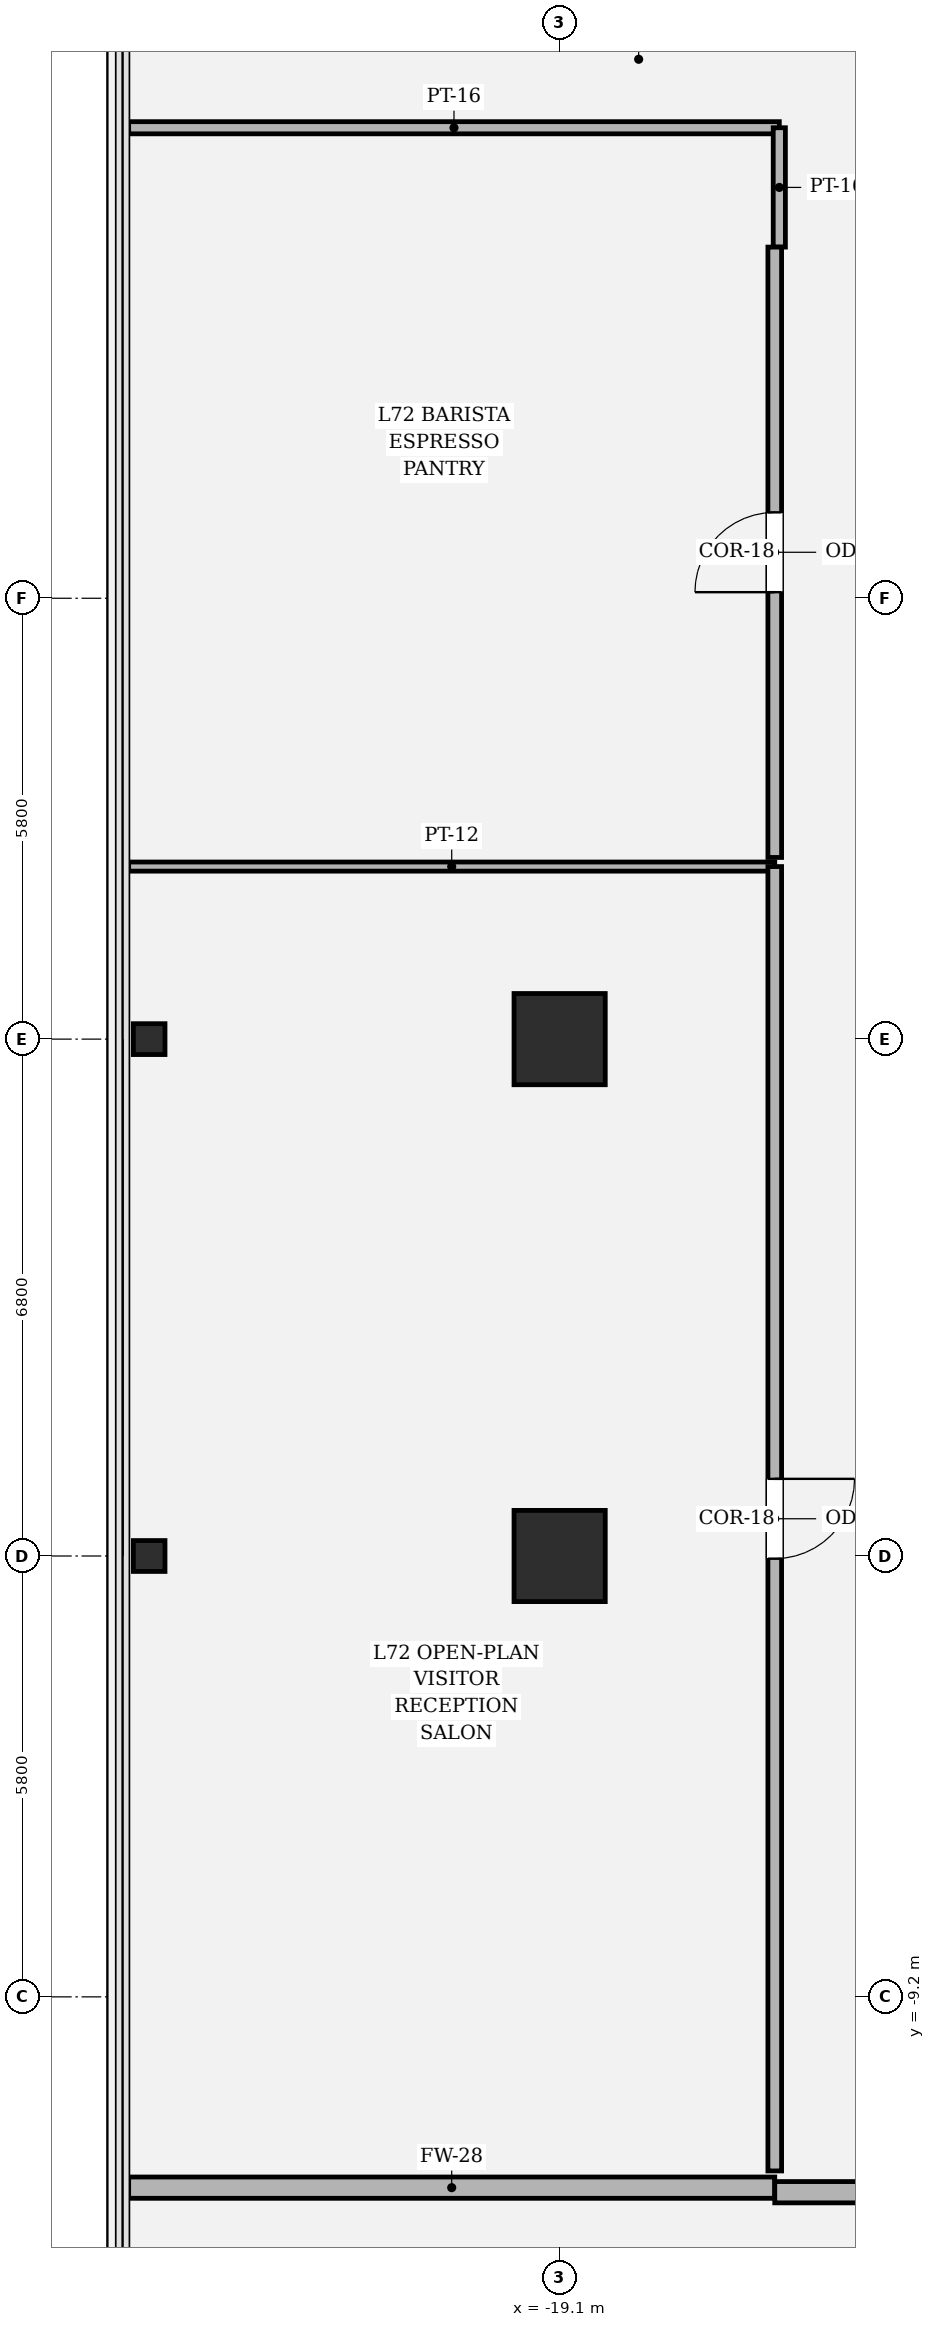
"""IFC4 building model, lengths in metres.
Left out: names, types, materials, properties, quantities, classifications, styles, units other than length and angle.
Written with IfcOpenShell. Run it as: python <this file> out.ifc"""

import sys

from ifc_helpers import new_model, si_unit, direction, frame, frame_2d, origin, origin_2d, place, context, subcontext, project, spatial, rectangle, hollow_rectangle, i_section, extrude, element, fill, save


model = new_model("IFC4")
c1 = context("Model", 3, precision=1e-05, world=origin(), true_north=direction((0.0, 1.0)))
c2 = subcontext(c1, "Body", "Model", "MODEL_VIEW")
j1 = project(units=[si_unit("LENGTHUNIT", "METRE"), si_unit("PLANEANGLEUNIT", "RADIAN")], contexts=[c1])
p1 = place(None, origin())
s1 = spatial("IfcSite", under=j1, at=p1, CompositionType="ELEMENT")
p2 = place(p1, origin())
s2 = spatial("IfcBuilding", under=s1, at=p2, CompositionType="ELEMENT")
p3 = place(p2, frame((0.0, 0.0, 304.8)))
s3 = spatial("IfcBuildingStorey", under=s2, at=p3, CompositionType="ELEMENT", Elevation=304.8)
for number, where, z_axis, x_axis in (
    (1, (-19.1, 3.4, 0.0), (0.0, 0.0, 1.0), (1.0, 0.0, 0.0)),
    (2, (-19.1, -3.4, 0.0), (0.0, 0.0, 1.0), (1.0, 0.0, 0.0)),
):
    element("IfcColumn", number, at=place(p3, frame(where, z_axis=z_axis, x_axis=x_axis)), inside=s3, PredefinedType="COLUMN", context=c2, shape_type="SweptSolid", body=[
        extrude(hollow_rectangle(XDim=1.2, YDim=1.2, WallThickness=0.035, at=origin_2d()), origin(), (0.0, 0.0, 1.0), 4.2),
    ])
for number, where, z_axis, x_axis in (
    (3, (-24.5, -3.4, 0.0), (0.0, 0.0, 1.0), (0.0, 1.0, 0.0)),
    (4, (-24.5, 3.4, 0.0), (0.0, 0.0, 1.0), (0.0, 1.0, 0.0)),
):
    element("IfcColumn", number, at=place(p3, frame(where, z_axis=z_axis, x_axis=x_axis)), inside=s3, PredefinedType="COLUMN", context=c2, shape_type="SweptSolid", body=[
        extrude(i_section(OverallWidth=0.406, OverallDepth=0.416, WebThickness=0.029, FlangeThickness=0.048, FilletRadius=0.018, at=origin_2d()), origin(), (0.0, 0.0, 1.0), 4.198),
    ])
p4 = place(p3, frame((-24.77, -11.71, 0.0), z_axis=(0.0, 0.0, 1.0), x_axis=(1.0, 0.0, 0.0)))
e5 = element("IfcWall", 5, at=p4, inside=s3, PredefinedType="SOLIDWALL", context=c2, shape_type="SweptSolid", body=[
    extrude(rectangle(XDim=8.5, YDim=0.28, at=frame_2d((4.25, 0.0))), origin(), (0.0, 0.0, 1.0), 2.714),
])
p5 = place(p3, frame((-16.27, -11.77, 0.0), z_axis=(0.0, 0.0, 1.0), x_axis=(1.0, 0.0, 0.0)))
e6 = element("IfcWall", 6, at=p5, inside=s3, PredefinedType="SOLIDWALL", context=c2, shape_type="SweptSolid", body=[
    extrude(rectangle(XDim=22.144, YDim=0.28, at=frame_2d((11.072, 0.0))), origin(), (0.0, 0.0, 1.0), 3.394),
])
p6 = place(p5, frame((10.222, 0.0, 0.0)))
e7 = element("IfcOpeningElement", 7, at=p6, cuts=e6, PredefinedType="OPENING", context=c2, shape_type="SweptSolid", body=[
    extrude(rectangle(XDim=1.7, YDim=2.3, at=frame_2d((0.85, 1.15))), frame((0.0, 0.15, 0.0), z_axis=(0.0, -1.0, 0.0), x_axis=(1.0, 0.0, 0.0)), (0.0, 0.0, 1.0), 0.3),
])
p7 = place(p3, frame((-24.77, 5.67, 0.0), z_axis=(0.0, 0.0, 1.0), x_axis=(1.0, 0.0, 0.0)))
e8 = element("IfcWall", 8, at=p7, inside=s3, PredefinedType="PARTITIONING", context=c2, shape_type="SweptSolid", body=[
    extrude(rectangle(XDim=8.5, YDim=0.12, at=frame_2d((4.25, 0.0))), origin(), (0.0, 0.0, 1.0), 2.714),
])
p8 = place(p3, frame((-16.27, 5.67, 0.0), z_axis=(0.0, 0.0, 1.0), x_axis=(0.0, -1.0, 0.0)))
e9 = element("IfcWall", 9, at=p8, inside=s3, PredefinedType="PARTITIONING", context=c2, shape_type="SweptSolid", body=[
    extrude(rectangle(XDim=17.16, YDim=0.18, at=frame_2d((8.58, 0.0))), origin(), (0.0, 0.0, 1.0), 3.394),
])
p9 = place(p8, frame((8.055, 0.0, 0.0)))
e10 = element("IfcOpeningElement", 10, at=p9, cuts=e9, PredefinedType="OPENING", context=c2, shape_type="SweptSolid", body=[
    extrude(rectangle(XDim=1.05, YDim=2.2, at=frame_2d((0.525, 1.1))), frame((0.0, 0.1, 0.0), z_axis=(0.0, -1.0, 0.0), x_axis=(1.0, 0.0, 0.0)), (0.0, 0.0, 1.0), 0.2),
])
p10 = place(p3, frame((-24.77, 15.39, 0.0), z_axis=(0.0, 0.0, 1.0), x_axis=(1.0, 0.0, 0.0)))
e11 = element("IfcWall", 11, at=p10, inside=s3, PredefinedType="PARTITIONING", context=c2, shape_type="SweptSolid", body=[
    extrude(rectangle(XDim=8.56, YDim=0.16, at=frame_2d((4.28, 0.0))), origin(), (0.0, 0.0, 1.0), 2.714),
])
p11 = place(p3, frame((-16.21, 15.39, 0.0), z_axis=(0.0, 0.0, 1.0), x_axis=(0.0, -1.0, 0.0)))
e12 = element("IfcWall", 12, at=p11, inside=s3, PredefinedType="PARTITIONING", context=c2, shape_type="SweptSolid", body=[
    extrude(rectangle(XDim=1.57, YDim=0.16, at=frame_2d((0.785, 0.0))), origin(), (0.0, 0.0, 1.0), 4.0),
])
p12 = place(p3, frame((-16.27, 13.82, 0.0), z_axis=(0.0, 0.0, 1.0), x_axis=(0.0, -1.0, 0.0)))
e13 = element("IfcWall", 13, at=p12, inside=s3, PredefinedType="PARTITIONING", context=c2, shape_type="SweptSolid", body=[
    extrude(rectangle(XDim=8.03, YDim=0.18, at=frame_2d((4.015, 0.0))), origin(), (0.0, 0.0, 1.0), 3.394),
])
p13 = place(p12, frame((3.49, 0.0, 0.0)))
e14 = element("IfcOpeningElement", 14, at=p13, cuts=e13, PredefinedType="OPENING", context=c2, shape_type="SweptSolid", body=[
    extrude(rectangle(XDim=1.05, YDim=2.2, at=frame_2d((0.525, 1.1))), frame((0.0, 0.1, 0.0), z_axis=(0.0, -1.0, 0.0), x_axis=(1.0, 0.0, 0.0)), (0.0, 0.0, 1.0), 0.2),
])
p14 = place(p9, origin())
e15 = element("IfcDoor", 15, at=p14, inside=s3, OperationType="SINGLE_SWING_LEFT", PredefinedType="DOOR", context=c2, shape_type="SweptSolid", body=[
    extrude(rectangle(XDim=1.05, YDim=2.2, at=frame_2d((0.525, 1.1))), frame((0.0, 0.025, 0.0), z_axis=(0.0, -1.0, 0.0), x_axis=(1.0, 0.0, 0.0)), (0.0, 0.0, 1.0), 0.05),
])
fill(e10, e15)
p15 = place(p13, origin())
e16 = element("IfcDoor", 16, at=p15, inside=s3, OperationType="SINGLE_SWING_RIGHT", PredefinedType="DOOR", context=c2, shape_type="SweptSolid", body=[
    extrude(rectangle(XDim=1.05, YDim=2.2, at=frame_2d((0.525, 1.1))), frame((0.0, 0.025, 0.0), z_axis=(0.0, -1.0, 0.0), x_axis=(1.0, 0.0, 0.0)), (0.0, 0.0, 1.0), 0.05),
])
fill(e14, e16)
save(model, sys.argv[1])
